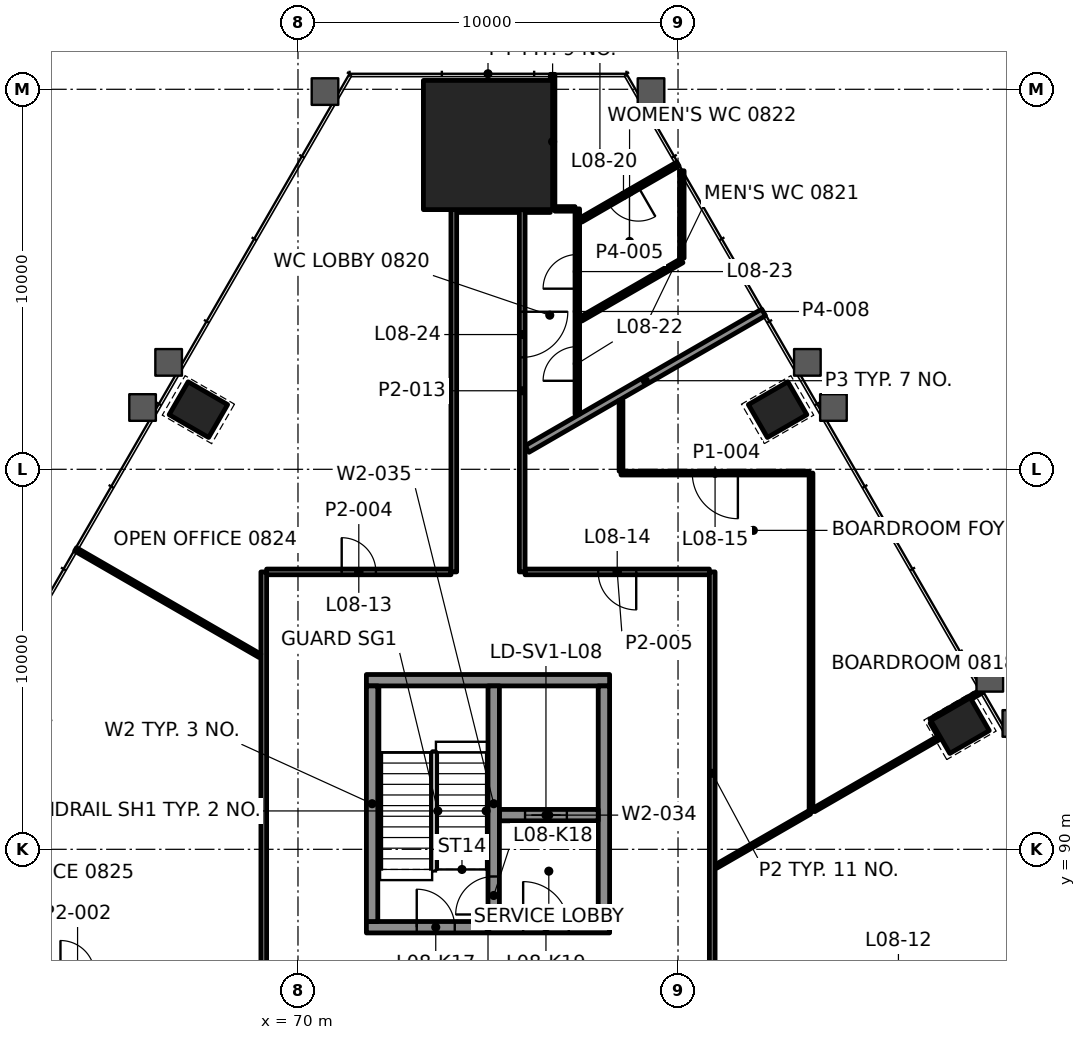
"""IFC4 building model, lengths in metres.
Left out: names, types, materials, properties, quantities, classifications, styles, units other than length and angle.
Written with IfcOpenShell. Run it as: python <this file> out.ifc"""

import sys

from ifc_helpers import new_model, si_unit, direction, frame, frame_2d, origin, origin_2d, place, context, subcontext, project, spatial, rectangle, extrude, element, fill, save


model = new_model("IFC4")
c1 = context("Model", 3, precision=1e-05, world=origin(), true_north=direction((0.0, 1.0)))
c2 = subcontext(c1, "Body", "Model", "MODEL_VIEW")
j1 = project(units=[si_unit("LENGTHUNIT", "METRE"), si_unit("PLANEANGLEUNIT", "RADIAN")], contexts=[c1])
p1 = place(None, origin())
s1 = spatial("IfcSite", under=j1, at=p1, CompositionType="ELEMENT")
p2 = place(p1, origin())
s2 = spatial("IfcBuilding", under=s1, at=p2, CompositionType="ELEMENT")
p3 = place(p2, frame((0.0, 0.0, 40.0)))
s3 = spatial("IfcBuildingStorey", under=s2, at=p3, CompositionType="ELEMENT", Elevation=40.0)
p4 = place(p3, frame((75.0, 108.534, 0.0), z_axis=(0.0, 0.0, 1.0), x_axis=(-1.0, 0.0, 0.0)))
e1 = element("IfcColumn", 1, at=p4, inside=s3, PredefinedType="COLUMN", context=c2, shape_type="SweptSolid", body=[
    extrude(rectangle(XDim=3.4, YDim=3.4, at=origin_2d()), origin(), (0.0, 0.0, 1.0), 4.2),
])
for number, where, z_axis, x_axis in (
    (2, (87.421, 93.256, -0.0), (0.0, 0.0, 1.0), (-0.5, 0.866, 0.0)),
    (3, (82.621, 101.57, -0.0), (0.0, 0.0, 1.0), (-0.5, 0.866, 0.0)),
    (4, (67.379, 101.57, -0.0), (0.0, 0.0, 1.0), (-0.5, -0.866, 0.0)),
):
    element("IfcColumn", number, at=place(p3, frame(where, z_axis=z_axis, x_axis=x_axis)), inside=s3, PredefinedType="COLUMN", context=c2, shape_type="SweptSolid", body=[
        extrude(rectangle(XDim=1.0, YDim=1.2, at=origin_2d()), origin(), (0.0, 0.0, 1.0), 4.2),
    ])
p5 = place(p3, frame((71.8, 87.95, 0.0), z_axis=(0.0, 0.0, 1.0), x_axis=(1.0, 0.0, 0.0)))
e5 = element("IfcWall", 5, at=p5, inside=s3, PredefinedType="SHEAR", context=c2, shape_type="SweptSolid", body=[
    extrude(rectangle(XDim=6.4, YDim=0.3, at=frame_2d((3.2, 0.0))), origin(), (0.0, 0.0, 1.0), 4.0),
])
p6 = place(p5, frame((1.325, 0.0, 0.0)))
e6 = element("IfcOpeningElement", 6, at=p6, cuts=e5, PredefinedType="OPENING", context=c2, shape_type="SweptSolid", body=[
    extrude(rectangle(XDim=1.0, YDim=2.1, at=frame_2d((0.5, 1.05))), frame((0.0, 0.16, 0.0), z_axis=(0.0, -1.0, 0.0), x_axis=(1.0, 0.0, 0.0)), (0.0, 0.0, 1.0), 0.32),
])
p7 = place(p5, frame((4.125, 0.0, 0.0)))
e7 = element("IfcOpeningElement", 7, at=p7, cuts=e5, PredefinedType="OPENING", context=c2, shape_type="SweptSolid", body=[
    extrude(rectangle(XDim=1.2, YDim=2.1, at=frame_2d((0.6, 1.05))), frame((0.0, 0.16, 0.0), z_axis=(0.0, -1.0, 0.0), x_axis=(1.0, 0.0, 0.0)), (0.0, 0.0, 1.0), 0.32),
])
p8 = place(p3, frame((71.8, 94.45, 0.0), z_axis=(0.0, 0.0, 1.0), x_axis=(1.0, 0.0, 0.0)))
e8 = element("IfcWall", 8, at=p8, inside=s3, PredefinedType="SHEAR", context=c2, shape_type="SweptSolid", body=[
    extrude(rectangle(XDim=6.4, YDim=0.3, at=frame_2d((3.2, 0.0))), origin(), (0.0, 0.0, 1.0), 4.0),
])
for number, where, z_axis, x_axis in (
    (9, (71.95, 88.1, 0.0), (0.0, 0.0, 1.0), (0.0, 1.0, 0.0)),
    (10, (78.05, 88.1, 0.0), (0.0, 0.0, 1.0), (0.0, 1.0, 0.0)),
):
    element("IfcWall", number, at=place(p3, frame(where, z_axis=z_axis, x_axis=x_axis)), inside=s3, PredefinedType="SHEAR", context=c2, shape_type="SweptSolid", body=[
        extrude(rectangle(XDim=6.2, YDim=0.3, at=frame_2d((3.1, 0.0))), origin(), (0.0, 0.0, 1.0), 4.0),
    ])
p9 = place(p3, frame((75.3, 90.9, 0.0), z_axis=(0.0, 0.0, 1.0), x_axis=(1.0, 0.0, 0.0)))
e11 = element("IfcWall", 11, at=p9, inside=s3, PredefinedType="SHEAR", context=c2, shape_type="SweptSolid", body=[
    extrude(rectangle(XDim=2.6, YDim=0.3, at=frame_2d((1.3, 0.0))), origin(), (0.0, 0.0, 1.0), 4.0),
])
p10 = place(p9, frame((0.675, 0.0, 0.0)))
e12 = element("IfcOpeningElement", 12, at=p10, cuts=e11, PredefinedType="OPENING", context=c2, shape_type="SweptSolid", body=[
    extrude(rectangle(XDim=1.1, YDim=2.1, at=frame_2d((0.55, 1.05))), frame((0.0, 0.16, 0.0), z_axis=(0.0, -1.0, 0.0), x_axis=(1.0, 0.0, 0.0)), (0.0, 0.0, 1.0), 0.32),
])
p11 = place(p3, frame((75.15, 88.1, 0.0), z_axis=(0.0, 0.0, 1.0), x_axis=(0.0, 1.0, 0.0)))
e13 = element("IfcWall", 13, at=p11, inside=s3, PredefinedType="SHEAR", context=c2, shape_type="SweptSolid", body=[
    extrude(rectangle(XDim=6.2, YDim=0.3, at=frame_2d((3.1, 0.0))), origin(), (0.0, 0.0, 1.0), 4.0),
])
p12 = place(p11, frame((0.185, 0.0, 0.0)))
e14 = element("IfcOpeningElement", 14, at=p12, cuts=e13, PredefinedType="OPENING", context=c2, shape_type="SweptSolid", body=[
    extrude(rectangle(XDim=1.0, YDim=2.1, at=frame_2d((0.5, 1.05))), frame((0.0, 0.16, 0.0), z_axis=(0.0, -1.0, 0.0), x_axis=(1.0, 0.0, 0.0)), (0.0, 0.0, 1.0), 0.32),
])
p13 = place(p3, frame((69.176, 97.3, 0.0), z_axis=(0.0, 0.0, 1.0), x_axis=(1.0, 0.0, 0.0)))
e15 = element("IfcWall", 15, at=p13, inside=s3, PredefinedType="PARTITIONING", context=c2, shape_type="SweptSolid", body=[
    extrude(rectangle(XDim=4.849, YDim=0.15, at=frame_2d((2.425, 0.0))), origin(), (0.0, 0.0, 1.0), 3.4),
])
p14 = place(p13, frame((1.975, 0.0, 0.0)))
e16 = element("IfcOpeningElement", 16, at=p14, cuts=e15, PredefinedType="OPENING", context=c2, shape_type="SweptSolid", body=[
    extrude(rectangle(XDim=0.9, YDim=2.1, at=frame_2d((0.45, 1.05))), frame((0.0, 0.085, 0.0), z_axis=(0.0, -1.0, 0.0), x_axis=(1.0, 0.0, 0.0)), (0.0, 0.0, 1.0), 0.17),
])
p15 = place(p3, frame((80.825, 97.3, 0.0), z_axis=(0.0, 0.0, 1.0), x_axis=(-1.0, 0.0, 0.0)))
e17 = element("IfcWall", 17, at=p15, inside=s3, PredefinedType="PARTITIONING", context=c2, shape_type="SweptSolid", body=[
    extrude(rectangle(XDim=4.85, YDim=0.15, at=frame_2d((2.425, 0.0))), origin(), (0.0, 0.0, 1.0), 3.4),
])
p16 = place(p15, frame((1.925, 0.0, 0.0)))
e18 = element("IfcOpeningElement", 18, at=p16, cuts=e17, PredefinedType="OPENING", context=c2, shape_type="SweptSolid", body=[
    extrude(rectangle(XDim=1.0, YDim=2.1, at=frame_2d((0.5, 1.05))), frame((0.0, 0.085, 0.0), z_axis=(0.0, -1.0, 0.0), x_axis=(1.0, 0.0, 0.0)), (0.0, 0.0, 1.0), 0.17),
])
p17 = place(p3, frame((83.45, 99.9, 0.0), z_axis=(0.0, 0.0, 1.0), x_axis=(-1.0, 0.0, 0.0)))
e19 = element("IfcWall", 19, at=p17, inside=s3, PredefinedType="PARTITIONING", context=c2, shape_type="SweptSolid", body=[
    extrude(rectangle(XDim=4.95, YDim=0.1, at=frame_2d((2.475, 0.0))), origin(), (0.0, 0.0, 1.0), 3.165),
])
p18 = place(p17, frame((1.875, 0.0, 0.0)))
e20 = element("IfcOpeningElement", 20, at=p18, cuts=e19, PredefinedType="OPENING", context=c2, shape_type="SweptSolid", body=[
    extrude(rectangle(XDim=1.2, YDim=2.1, at=frame_2d((0.6, 1.05))), frame((0.0, 0.06, 0.0), z_axis=(0.0, -1.0, 0.0), x_axis=(1.0, 0.0, 0.0)), (0.0, 0.0, 1.0), 0.12),
])
p19 = place(p3, frame((74.176, 106.834, 0.0), z_axis=(0.0, 0.0, 1.0), x_axis=(1.0, 0.0, 0.0)))
e21 = element("IfcWall", 21, at=p19, inside=s3, PredefinedType="PARTITIONING", context=c2, shape_type="SweptSolid", body=[
    extrude(rectangle(XDim=1.649, YDim=0.15, at=frame_2d((0.825, 0.0))), origin(), (0.0, 0.0, 1.0), 3.397),
])
p20 = place(p3, frame((76.76, 106.853, 0.0), z_axis=(0.0, 0.0, 1.0), x_axis=(1.0, 0.0, 0.0)))
e22 = element("IfcWall", 22, at=p20, inside=s3, PredefinedType="PARTITIONING", context=c2, shape_type="SweptSolid", body=[
    extrude(rectangle(XDim=0.53, YDim=0.12, at=frame_2d((0.265, 0.0))), origin(), (0.0, 0.0, 1.0), 3.4),
])
p21 = place(p3, frame((81.001, 89.55, 0.0), z_axis=(0.0, 0.0, 1.0), x_axis=(0.866019653938, 0.500009958894, 0.0)))
e23 = element("IfcWall", 23, at=p21, inside=s3, PredefinedType="PARTITIONING", context=c2, shape_type="SweptSolid", body=[
    extrude(rectangle(XDim=2.842, YDim=0.1, at=frame_2d((1.421, 0.0))), origin(), (0.0, 0.0, 1.0), 3.4),
])
p22 = place(p3, frame((86.651, 93.389, 0.0), z_axis=(0.0, 0.0, 1.0), x_axis=(0.866018739521, 0.500011542666, 0.0)))
e24 = element("IfcWall", 24, at=p22, inside=s3, PredefinedType="PARTITIONING", context=c2, shape_type="SweptSolid", body=[
    extrude(rectangle(XDim=1.56, YDim=0.1, at=frame_2d((0.78, 0.0))), origin(), (0.0, 0.0, 1.0), 3.165),
])
p23 = place(p3, frame((76.027, 100.534, 0.0), z_axis=(0.0, 0.0, 1.0), x_axis=(0.866029480033, 0.499992939664, 0.0)))
e25 = element("IfcWall", 25, at=p23, inside=s3, PredefinedType="PARTITIONING", context=c2, shape_type="SweptSolid", body=[
    extrude(rectangle(XDim=7.188, YDim=0.2, at=frame_2d((3.594, 0.0))), origin(), (0.0, 0.0, 1.0), 3.4),
])
p24 = place(p3, frame((77.445, 103.956, 0.0), z_axis=(0.0, 0.0, 1.0), x_axis=(0.86599994119, 0.500044099915, 0.0)))
e26 = element("IfcWall", 26, at=p24, inside=s3, PredefinedType="PARTITIONING", context=c2, shape_type="SweptSolid", body=[
    extrude(rectangle(XDim=3.066, YDim=0.12, at=frame_2d((1.533, 0.0))), origin(), (0.0, 0.0, 1.0), 3.4),
])
p25 = place(p3, frame((79.997, 108.033, 0.0), z_axis=(0.0, 0.0, 1.0), x_axis=(-0.866038018385, -0.499978150234, 0.0)))
e27 = element("IfcWall", 27, at=p25, inside=s3, PredefinedType="PARTITIONING", context=c2, shape_type="SweptSolid", body=[
    extrude(rectangle(XDim=2.948, YDim=0.12, at=frame_2d((1.474, 0.0))), origin(), (0.0, 0.0, 1.0), 3.4),
])
p26 = place(p25, frame((1.204, 0.0, 0.0)))
e28 = element("IfcOpeningElement", 28, at=p26, cuts=e27, PredefinedType="OPENING", context=c2, shape_type="SweptSolid", body=[
    extrude(rectangle(XDim=0.9, YDim=2.1, at=frame_2d((0.45, 1.05))), frame((0.0, 0.07, 0.0), z_axis=(0.0, -1.0, 0.0), x_axis=(1.0, 0.0, 0.0)), (0.0, 0.0, 1.0), 0.14),
])
p27 = place(p3, frame((83.5, 90.993, 0.0), z_axis=(0.0, 0.0, 1.0), x_axis=(0.0, 1.0, 0.0)))
e29 = element("IfcWall", 29, at=p27, inside=s3, PredefinedType="PARTITIONING", context=c2, shape_type="SweptSolid", body=[
    extrude(rectangle(XDim=8.907, YDim=0.1, at=frame_2d((4.454, 0.0))), origin(), (0.0, 0.0, 1.0), 3.165),
])
p28 = place(p3, frame((80.9, 86.7, 0.0), z_axis=(0.0, 0.0, 1.0), x_axis=(0.0, 1.0, 0.0)))
e30 = element("IfcWall", 30, at=p28, inside=s3, PredefinedType="PARTITIONING", context=c2, shape_type="SweptSolid", body=[
    extrude(rectangle(XDim=10.6, YDim=0.15, at=frame_2d((5.3, 0.0))), origin(), (0.0, 0.0, 1.0), 3.4),
])
p29 = place(p3, frame((80.1, 105.558, 0.0), z_axis=(0.0, 0.0, 1.0), x_axis=(0.0, 1.0, 0.0)))
e31 = element("IfcWall", 31, at=p29, inside=s3, PredefinedType="PARTITIONING", context=c2, shape_type="SweptSolid", body=[
    extrude(rectangle(XDim=2.297, YDim=0.12, at=frame_2d((1.149, 0.0))), origin(), (0.0, 0.0, 1.0), 3.4),
])
p30 = place(p3, frame((78.5, 99.95, 0.0), z_axis=(0.0, 0.0, 1.0), x_axis=(0.0, 1.0, 0.0)))
e32 = element("IfcWall", 32, at=p30, inside=s3, PredefinedType="PARTITIONING", context=c2, shape_type="SweptSolid", body=[
    extrude(rectangle(XDim=1.867, YDim=0.1, at=frame_2d((0.934, 0.0))), origin(), (0.0, 0.0, 1.0), 3.4),
])
p31 = place(p3, frame((77.35, 101.454, 0.0), z_axis=(0.0, 0.0, 1.0), x_axis=(0.0, 1.0, 0.0)))
e33 = element("IfcWall", 33, at=p31, inside=s3, PredefinedType="PARTITIONING", context=c2, shape_type="SweptSolid", body=[
    extrude(rectangle(XDim=5.399, YDim=0.12, at=frame_2d((2.699, 0.0))), origin(), (0.0, 0.0, 1.0), 3.4),
])
p32 = place(p31, frame((0.875, 0.0, 0.0)))
e34 = element("IfcOpeningElement", 34, at=p32, cuts=e33, PredefinedType="OPENING", context=c2, shape_type="SweptSolid", body=[
    extrude(rectangle(XDim=0.9, YDim=2.1, at=frame_2d((0.45, 1.05))), frame((0.0, 0.07, 0.0), z_axis=(0.0, -1.0, 0.0), x_axis=(1.0, 0.0, 0.0)), (0.0, 0.0, 1.0), 0.14),
])
p33 = place(p31, frame((3.299, 0.0, 0.0)))
e35 = element("IfcOpeningElement", 35, at=p33, cuts=e33, PredefinedType="OPENING", context=c2, shape_type="SweptSolid", body=[
    extrude(rectangle(XDim=0.9, YDim=2.1, at=frame_2d((0.45, 1.05))), frame((0.0, 0.07, 0.0), z_axis=(0.0, -1.0, 0.0), x_axis=(1.0, 0.0, 0.0)), (0.0, 0.0, 1.0), 0.14),
])
p34 = place(p3, frame((76.7, 106.85, 0.0), z_axis=(0.0, 0.0, 1.0), x_axis=(0.0, 1.0, 0.0)))
e36 = element("IfcWall", 36, at=p34, inside=s3, PredefinedType="PARTITIONING", context=c2, shape_type="SweptSolid", body=[
    extrude(rectangle(XDim=3.543, YDim=0.12, at=frame_2d((1.772, 0.0))), origin(), (0.0, 0.0, 1.0), 3.4),
])
p35 = place(p3, frame((75.9, 106.834, 0.0), z_axis=(0.0, 0.0, 1.0), x_axis=(0.0, -1.0, 0.0)))
e37 = element("IfcWall", 37, at=p35, inside=s3, PredefinedType="PARTITIONING", context=c2, shape_type="SweptSolid", body=[
    extrude(rectangle(XDim=9.534, YDim=0.15, at=frame_2d((4.767, 0.0))), origin(), (0.0, 0.0, 1.0), 3.4),
])
p36 = place(p35, frame((2.688, 0.0, 0.0)))
e38 = element("IfcOpeningElement", 38, at=p36, cuts=e37, PredefinedType="OPENING", context=c2, shape_type="SweptSolid", body=[
    extrude(rectangle(XDim=1.2, YDim=2.1, at=frame_2d((0.6, 1.05))), frame((0.0, 0.085, 0.0), z_axis=(0.0, -1.0, 0.0), x_axis=(1.0, 0.0, 0.0)), (0.0, 0.0, 1.0), 0.17),
])
p37 = place(p3, frame((74.1, 97.3, 0.0), z_axis=(0.0, 0.0, 1.0), x_axis=(0.0, 1.0, 0.0)))
e39 = element("IfcWall", 39, at=p37, inside=s3, PredefinedType="PARTITIONING", context=c2, shape_type="SweptSolid", body=[
    extrude(rectangle(XDim=9.533, YDim=0.15, at=frame_2d((4.767, 0.0))), origin(), (0.0, 0.0, 1.0), 3.4),
])
p38 = place(p3, frame((69.1, 86.7, 0.0), z_axis=(0.0, 0.0, 1.0), x_axis=(0.0, 1.0, 0.0)))
e40 = element("IfcWall", 40, at=p38, inside=s3, PredefinedType="PARTITIONING", context=c2, shape_type="SweptSolid", body=[
    extrude(rectangle(XDim=10.6, YDim=0.15, at=frame_2d((5.3, 0.0))), origin(), (0.0, 0.0, 1.0), 3.4),
])
p39 = place(p3, frame((86.876, 93.0, 0.0), z_axis=(0.0, 0.0, 1.0), x_axis=(-0.500409926597, 0.865788603161, 0.0)))
e41 = element("IfcWall", 41, at=p39, inside=s3, PredefinedType="PARTITIONING", context=c2, shape_type="SweptSolid", body=[
    extrude(rectangle(XDim=0.4, YDim=0.1, at=frame_2d((0.2, 0.0))), origin(), (0.0, 0.0, 1.0), 3.4),
])
p40 = place(p3, frame((68.999, 95.093, 0.0), z_axis=(0.0, 0.0, 1.0), x_axis=(-0.866032434152, 0.499987822848, 0.0)))
e42 = element("IfcWall", 42, at=p40, inside=s3, PredefinedType="PARTITIONING", context=c2, shape_type="SweptSolid", body=[
    extrude(rectangle(XDim=5.601, YDim=0.1, at=frame_2d((2.801, 0.0))), origin(), (0.0, 0.0, 1.0), 3.165),
])
p41 = place(p3, frame((75.975, 106.834, 0.0), z_axis=(0.0, 0.0, 1.0), x_axis=(1.0, 0.0, 0.0)))
e43 = element("IfcWall", 43, at=p41, inside=s3, PredefinedType="PARTITIONING", context=c2, shape_type="SweptSolid", body=[
    extrude(rectangle(XDim=0.664, YDim=0.15, at=frame_2d((0.332, 0.0))), origin(), (0.0, 0.0, 1.0), 3.4),
])
p42 = place(p3, frame((83.575, 91.036, 0.0), z_axis=(0.0, 0.0, 1.0), x_axis=(0.866032607753, 0.499987522153, 0.0)))
e44 = element("IfcWall", 44, at=p42, inside=s3, PredefinedType="PARTITIONING", context=c2, shape_type="SweptSolid", body=[
    extrude(rectangle(XDim=3.8, YDim=0.1, at=frame_2d((1.9, 0.0))), origin(), (0.0, 0.0, 1.0), 3.4),
])
p43 = place(p14, origin())
e45 = element("IfcDoor", 45, at=p43, inside=s3, OperationType="SINGLE_SWING_LEFT", PredefinedType="DOOR", context=c2, shape_type="SweptSolid", body=[
    extrude(rectangle(XDim=0.9, YDim=2.1, at=frame_2d((0.45, 1.05))), frame((0.0, 0.025, 0.0), z_axis=(0.0, -1.0, 0.0), x_axis=(1.0, 0.0, 0.0)), (0.0, 0.0, 1.0), 0.05),
])
fill(e16, e45)
p44 = place(p16, origin())
e46 = element("IfcDoor", 46, at=p44, inside=s3, OperationType="SINGLE_SWING_LEFT", PredefinedType="DOOR", context=c2, shape_type="SweptSolid", body=[
    extrude(rectangle(XDim=1.0, YDim=2.1, at=frame_2d((0.5, 1.05))), frame((0.0, 0.025, 0.0), z_axis=(0.0, -1.0, 0.0), x_axis=(1.0, 0.0, 0.0)), (0.0, 0.0, 1.0), 0.05),
])
fill(e18, e46)
p45 = place(p18, origin())
e47 = element("IfcDoor", 47, at=p45, inside=s3, OperationType="DOUBLE_DOOR_SINGLE_SWING", PredefinedType="DOOR", context=c2, shape_type="SweptSolid", body=[
    extrude(rectangle(XDim=1.2, YDim=2.1, at=frame_2d((0.6, 1.05))), frame((0.0, 0.025, 0.0), z_axis=(0.0, -1.0, 0.0), x_axis=(1.0, 0.0, 0.0)), (0.0, 0.0, 1.0), 0.05),
])
fill(e20, e47)
p46 = place(p26, origin())
e48 = element("IfcDoor", 48, at=p46, inside=s3, OperationType="SINGLE_SWING_LEFT", PredefinedType="DOOR", context=c2, shape_type="SweptSolid", body=[
    extrude(rectangle(XDim=0.9, YDim=2.1, at=frame_2d((0.45, 1.05))), frame((0.0, 0.025, 0.0), z_axis=(0.0, -1.0, 0.0), x_axis=(1.0, 0.0, 0.0)), (0.0, 0.0, 1.0), 0.05),
])
fill(e28, e48)
p47 = place(p32, origin())
e49 = element("IfcDoor", 49, at=p47, inside=s3, OperationType="SINGLE_SWING_RIGHT", PredefinedType="DOOR", context=c2, shape_type="SweptSolid", body=[
    extrude(rectangle(XDim=0.9, YDim=2.1, at=frame_2d((0.45, 1.05))), frame((0.0, 0.025, 0.0), z_axis=(0.0, -1.0, 0.0), x_axis=(1.0, 0.0, 0.0)), (0.0, 0.0, 1.0), 0.05),
])
fill(e34, e49)
p48 = place(p33, origin())
e50 = element("IfcDoor", 50, at=p48, inside=s3, OperationType="SINGLE_SWING_LEFT", PredefinedType="DOOR", context=c2, shape_type="SweptSolid", body=[
    extrude(rectangle(XDim=0.9, YDim=2.1, at=frame_2d((0.45, 1.05))), frame((0.0, 0.025, 0.0), z_axis=(0.0, -1.0, 0.0), x_axis=(1.0, 0.0, 0.0)), (0.0, 0.0, 1.0), 0.05),
])
fill(e35, e50)
p49 = place(p36, origin())
e51 = element("IfcDoor", 51, at=p49, inside=s3, OperationType="DOUBLE_DOOR_SINGLE_SWING", PredefinedType="DOOR", context=c2, shape_type="SweptSolid", body=[
    extrude(rectangle(XDim=1.2, YDim=2.1, at=frame_2d((0.6, 1.05))), frame((0.0, 0.025, 0.0), z_axis=(0.0, -1.0, 0.0), x_axis=(1.0, 0.0, 0.0)), (0.0, 0.0, 1.0), 0.05),
])
fill(e38, e51)
p50 = place(p10, origin())
e52 = element("IfcDoor", 52, at=p50, inside=s3, OperationType="DOUBLE_DOOR_SLIDING", PredefinedType="DOOR", context=c2, shape_type="SweptSolid", body=[
    extrude(rectangle(XDim=1.1, YDim=2.1, at=frame_2d((0.55, 1.05))), frame((0.0, 0.025, 0.0), z_axis=(0.0, -1.0, 0.0), x_axis=(1.0, 0.0, 0.0)), (0.0, 0.0, 1.0), 0.05),
])
fill(e12, e52)
p51 = place(p6, origin())
e53 = element("IfcDoor", 53, at=p51, inside=s3, OperationType="SINGLE_SWING_RIGHT", PredefinedType="DOOR", context=c2, shape_type="SweptSolid", body=[
    extrude(rectangle(XDim=1.0, YDim=2.1, at=frame_2d((0.5, 1.05))), frame((0.0, 0.025, 0.0), z_axis=(0.0, -1.0, 0.0), x_axis=(1.0, 0.0, 0.0)), (0.0, 0.0, 1.0), 0.05),
])
fill(e6, e53)
p52 = place(p12, origin())
e54 = element("IfcDoor", 54, at=p52, inside=s3, OperationType="SINGLE_SWING_LEFT", PredefinedType="DOOR", context=c2, shape_type="SweptSolid", body=[
    extrude(rectangle(XDim=1.0, YDim=2.1, at=frame_2d((0.5, 1.05))), frame((0.0, 0.025, 0.0), z_axis=(0.0, -1.0, 0.0), x_axis=(1.0, 0.0, 0.0)), (0.0, 0.0, 1.0), 0.05),
])
fill(e14, e54)
p53 = place(p7, origin())
e55 = element("IfcDoor", 55, at=p53, inside=s3, OperationType="SINGLE_SWING_RIGHT", PredefinedType="DOOR", context=c2, shape_type="SweptSolid", body=[
    extrude(rectangle(XDim=1.2, YDim=2.1, at=frame_2d((0.6, 1.05))), frame((0.0, 0.025, 0.0), z_axis=(0.0, -1.0, 0.0), x_axis=(1.0, 0.0, 0.0)), (0.0, 0.0, 1.0), 0.05),
])
fill(e7, e55)
save(model, sys.argv[1])
